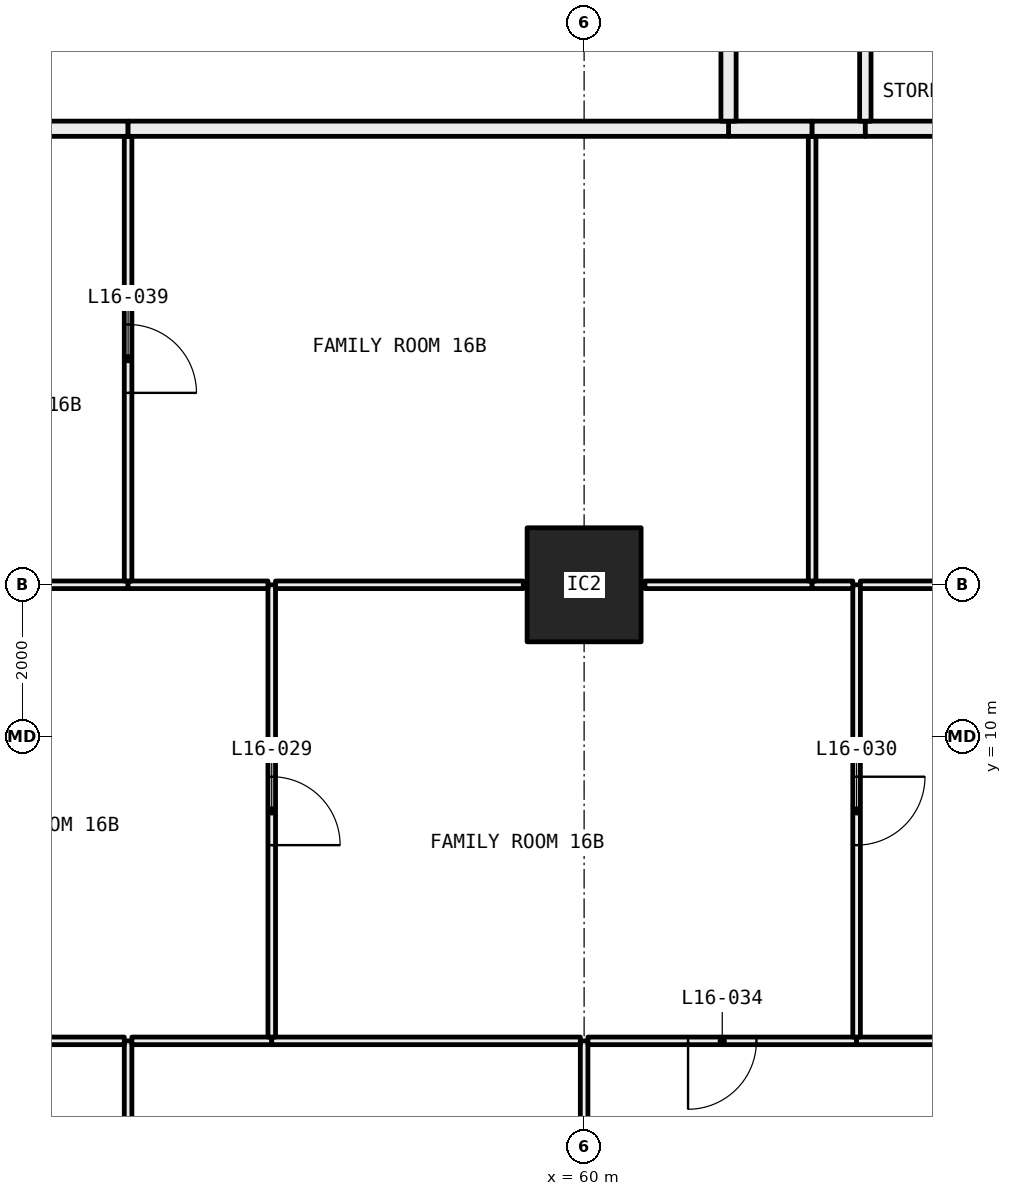
"""IFC4 building model, lengths in metres.
Left out: names, types, materials, properties, quantities, classifications, styles, units other than length and angle.
Written with IfcOpenShell. Run it as: python <this file> out.ifc"""

import sys

from ifc_helpers import new_model, si_unit, direction, frame, frame_2d, origin, origin_2d, place, context, subcontext, project, spatial, rectangle, hollow_rectangle, extrude, element, fill, save


model = new_model("IFC4")
c1 = context("Model", 3, precision=1e-05, world=origin(), true_north=direction((0.0, 1.0)))
c2 = subcontext(c1, "Body", "Model", "MODEL_VIEW")
j1 = project(units=[si_unit("LENGTHUNIT", "METRE"), si_unit("PLANEANGLEUNIT", "RADIAN")], contexts=[c1])
p1 = place(None, origin())
s1 = spatial("IfcSite", under=j1, at=p1, CompositionType="ELEMENT")
p2 = place(p1, origin())
s2 = spatial("IfcBuilding", under=s1, at=p2, CompositionType="ELEMENT")
p3 = place(p2, frame((0.0, 0.0, 67.95)))
s3 = spatial("IfcBuildingStorey", under=s2, at=p3, CompositionType="ELEMENT", Elevation=67.95)
p4 = place(p3, frame((60.0, 12.0, 0.0), z_axis=(0.0, 0.0, 1.0), x_axis=(1.0, 0.0, 0.0)))
e1 = element("IfcColumn", 1, at=p4, inside=s3, PredefinedType="COLUMN", context=c2, shape_type="SweptSolid", body=[
    extrude(hollow_rectangle(XDim=1.5, YDim=1.5, WallThickness=0.065, at=origin_2d()), origin(), (0.0, 0.0, 1.0), 3.05),
])
p5 = place(p3, frame((54.0, 0.72, 0.0), z_axis=(0.0, 0.0, 1.0), x_axis=(0.0, 1.0, 0.0)))
e2 = element("IfcWall", 2, at=p5, inside=s3, PredefinedType="PARTITIONING", context=c2, shape_type="SweptSolid", body=[
    extrude(rectangle(XDim=5.28, YDim=0.1, at=frame_2d((2.64, 0.0))), origin(), (0.0, 0.0, 1.0), 3.05),
])
p6 = place(p5, frame((2.19, 0.0, 0.0)))
e3 = element("IfcOpeningElement", 3, at=p6, cuts=e2, PredefinedType="OPENING", context=c2, shape_type="SweptSolid", body=[
    extrude(rectangle(XDim=0.9, YDim=2.1, at=frame_2d((0.45, 1.05))), frame((0.0, 0.06, 0.0), z_axis=(0.0, -1.0, 0.0), x_axis=(1.0, 0.0, 0.0)), (0.0, 0.0, 1.0), 0.12),
])
p7 = place(p3, frame((53.95, 6.0, 0.0), z_axis=(0.0, 0.0, 1.0), x_axis=(-1.0, 0.0, 0.0)))
e4 = element("IfcWall", 4, at=p7, inside=s3, PredefinedType="PARTITIONING", context=c2, shape_type="SweptSolid", body=[
    extrude(rectangle(XDim=5.755, YDim=0.1, at=frame_2d((2.877, 0.0))), origin(), (0.0, 0.0, 1.0), 3.05),
])
p8 = place(p7, frame((2.427, 0.0, 0.0)))
e5 = element("IfcOpeningElement", 5, at=p8, cuts=e4, PredefinedType="OPENING", context=c2, shape_type="SweptSolid", body=[
    extrude(rectangle(XDim=0.9, YDim=2.1, at=frame_2d((0.45, 1.05))), frame((0.0, 0.06, 0.0), z_axis=(0.0, -1.0, 0.0), x_axis=(1.0, 0.0, 0.0)), (0.0, 0.0, 1.0), 0.12),
])
p9 = place(p3, frame((60.0, 0.72, 0.0), z_axis=(0.0, 0.0, 1.0), x_axis=(0.0, 1.0, 0.0)))
e6 = element("IfcWall", 6, at=p9, inside=s3, PredefinedType="PARTITIONING", context=c2, shape_type="SweptSolid", body=[
    extrude(rectangle(XDim=5.28, YDim=0.1, at=frame_2d((2.64, 0.0))), origin(), (0.0, 0.0, 1.0), 2.45),
])
p10 = place(p3, frame((55.89, 6.0, 0.0), z_axis=(0.0, 0.0, 1.0), x_axis=(-1.0, 0.0, 0.0)))
e7 = element("IfcWall", 7, at=p10, inside=s3, PredefinedType="PARTITIONING", context=c2, shape_type="SweptSolid", body=[
    extrude(rectangle(XDim=1.84, YDim=0.1, at=frame_2d((0.92, 0.0))), origin(), (0.0, 0.0, 1.0), 3.05),
])
p11 = place(p3, frame((59.95, 6.0, 0.0), z_axis=(0.0, 0.0, 1.0), x_axis=(-1.0, 0.0, 0.0)))
e8 = element("IfcWall", 8, at=p11, inside=s3, PredefinedType="PARTITIONING", context=c2, shape_type="SweptSolid", body=[
    extrude(rectangle(XDim=4.06, YDim=0.1, at=frame_2d((2.03, 0.0))), origin(), (0.0, 0.0, 1.0), 2.45),
])
p12 = place(p3, frame((63.585, 6.0, 0.0), z_axis=(0.0, 0.0, 1.0), x_axis=(-1.0, 0.0, 0.0)))
e9 = element("IfcWall", 9, at=p12, inside=s3, PredefinedType="PARTITIONING", context=c2, shape_type="SweptSolid", body=[
    extrude(rectangle(XDim=3.535, YDim=0.1, at=frame_2d((1.768, 0.0))), origin(), (0.0, 0.0, 1.0), 2.45),
])
p13 = place(p12, frame((1.317, 0.0, 0.0)))
e10 = element("IfcOpeningElement", 10, at=p13, cuts=e9, PredefinedType="OPENING", context=c2, shape_type="SweptSolid", body=[
    extrude(rectangle(XDim=0.9, YDim=2.1, at=frame_2d((0.45, 1.05))), frame((0.0, 0.06, 0.0), z_axis=(0.0, -1.0, 0.0), x_axis=(1.0, 0.0, 0.0)), (0.0, 0.0, 1.0), 0.12),
])
p14 = place(p3, frame((65.28, 6.0, 0.0), z_axis=(0.0, 0.0, 1.0), x_axis=(-1.0, 0.0, 0.0)))
e11 = element("IfcWall", 11, at=p14, inside=s3, PredefinedType="PARTITIONING", context=c2, shape_type="SweptSolid", body=[
    extrude(rectangle(XDim=1.695, YDim=0.1, at=frame_2d((0.848, 0.0))), origin(), (0.0, 0.0, 1.0), 3.05),
])
p15 = place(p3, frame((55.89, 6.05, 0.0), z_axis=(0.0, 0.0, 1.0), x_axis=(0.0, 1.0, 0.0)))
e12 = element("IfcWall", 12, at=p15, inside=s3, PredefinedType="PARTITIONING", context=c2, shape_type="SweptSolid", body=[
    extrude(rectangle(XDim=5.95, YDim=0.1, at=frame_2d((2.975, 0.0))), origin(), (0.0, 0.0, 1.0), 2.45),
])
p16 = place(p15, frame((2.525, 0.0, 0.0)))
e13 = element("IfcOpeningElement", 13, at=p16, cuts=e12, PredefinedType="OPENING", context=c2, shape_type="SweptSolid", body=[
    extrude(rectangle(XDim=0.9, YDim=2.1, at=frame_2d((0.45, 1.05))), frame((0.0, 0.06, 0.0), z_axis=(0.0, -1.0, 0.0), x_axis=(1.0, 0.0, 0.0)), (0.0, 0.0, 1.0), 0.12),
])
p17 = place(p3, frame((54.0, 12.0, 0.0), z_axis=(0.0, 0.0, 1.0), x_axis=(-1.0, 0.0, 0.0)))
e14 = element("IfcWall", 14, at=p17, inside=s3, PredefinedType="PARTITIONING", context=c2, shape_type="SweptSolid", body=[
    extrude(rectangle(XDim=4.5, YDim=0.1, at=frame_2d((2.25, 0.0))), origin(), (0.0, 0.0, 1.0), 2.45),
])
p18 = place(p17, frame((1.8, 0.0, 0.0)))
e15 = element("IfcOpeningElement", 15, at=p18, cuts=e14, PredefinedType="OPENING", context=c2, shape_type="SweptSolid", body=[
    extrude(rectangle(XDim=0.9, YDim=2.1, at=frame_2d((0.45, 1.05))), frame((0.0, 0.06, 0.0), z_axis=(0.0, -1.0, 0.0), x_axis=(1.0, 0.0, 0.0)), (0.0, 0.0, 1.0), 0.12),
])
p19 = place(p3, frame((55.84, 12.0, 0.0), z_axis=(0.0, 0.0, 1.0), x_axis=(-1.0, 0.0, 0.0)))
e16 = element("IfcWall", 16, at=p19, inside=s3, PredefinedType="PARTITIONING", context=c2, shape_type="SweptSolid", body=[
    extrude(rectangle(XDim=1.84, YDim=0.1, at=frame_2d((0.92, 0.0))), origin(), (0.0, 0.0, 1.0), 2.45),
])
p20 = place(p3, frame((63.585, 6.05, 0.0), z_axis=(0.0, 0.0, 1.0), x_axis=(0.0, 1.0, 0.0)))
e17 = element("IfcWall", 17, at=p20, inside=s3, PredefinedType="PARTITIONING", context=c2, shape_type="SweptSolid", body=[
    extrude(rectangle(XDim=5.95, YDim=0.1, at=frame_2d((2.975, 0.0))), origin(), (0.0, 0.0, 1.0), 2.45),
])
p21 = place(p20, frame((2.525, 0.0, 0.0)))
e18 = element("IfcOpeningElement", 18, at=p21, cuts=e17, PredefinedType="OPENING", context=c2, shape_type="SweptSolid", body=[
    extrude(rectangle(XDim=0.9, YDim=2.1, at=frame_2d((0.45, 1.05))), frame((0.0, 0.06, 0.0), z_axis=(0.0, -1.0, 0.0), x_axis=(1.0, 0.0, 0.0)), (0.0, 0.0, 1.0), 0.12),
])
p22 = place(p3, frame((59.2, 12.0, 0.0), z_axis=(0.0, 0.0, 1.0), x_axis=(-1.0, 0.0, 0.0)))
e19 = element("IfcWall", 19, at=p22, inside=s3, PredefinedType="PARTITIONING", context=c2, shape_type="SweptSolid", body=[
    extrude(rectangle(XDim=3.26, YDim=0.1, at=frame_2d((1.63, 0.0))), origin(), (0.0, 0.0, 1.0), 2.45),
])
p23 = place(p3, frame((63.0, 12.0, 0.0), z_axis=(0.0, 0.0, 1.0), x_axis=(-1.0, 0.0, 0.0)))
e20 = element("IfcWall", 20, at=p23, inside=s3, PredefinedType="PARTITIONING", context=c2, shape_type="SweptSolid", body=[
    extrude(rectangle(XDim=2.2, YDim=0.1, at=frame_2d((1.1, 0.0))), origin(), (0.0, 0.0, 1.0), 2.45),
])
p24 = place(p3, frame((63.535, 12.0, 0.0), z_axis=(0.0, 0.0, 1.0), x_axis=(-1.0, 0.0, 0.0)))
e21 = element("IfcWall", 21, at=p24, inside=s3, PredefinedType="PARTITIONING", context=c2, shape_type="SweptSolid", body=[
    extrude(rectangle(XDim=0.535, YDim=0.1, at=frame_2d((0.268, 0.0))), origin(), (0.0, 0.0, 1.0), 2.45),
])
p25 = place(p3, frame((71.28, 12.0, 0.0), z_axis=(0.0, 0.0, 1.0), x_axis=(-1.0, 0.0, 0.0)))
e22 = element("IfcWall", 22, at=p25, inside=s3, PredefinedType="PARTITIONING", context=c2, shape_type="SweptSolid", body=[
    extrude(rectangle(XDim=7.645, YDim=0.1, at=frame_2d((3.823, 0.0))), origin(), (0.0, 0.0, 1.0), 2.45),
])
p26 = place(p25, frame((3.373, 0.0, 0.0)))
e23 = element("IfcOpeningElement", 23, at=p26, cuts=e22, PredefinedType="OPENING", context=c2, shape_type="SweptSolid", body=[
    extrude(rectangle(XDim=0.9, YDim=2.1, at=frame_2d((0.45, 1.05))), frame((0.0, 0.06, 0.0), z_axis=(0.0, -1.0, 0.0), x_axis=(1.0, 0.0, 0.0)), (0.0, 0.0, 1.0), 0.12),
])
p27 = place(p3, frame((54.0, 12.05, 0.0), z_axis=(0.0, 0.0, 1.0), x_axis=(0.0, 1.0, 0.0)))
e24 = element("IfcWall", 24, at=p27, inside=s3, PredefinedType="PARTITIONING", context=c2, shape_type="SweptSolid", body=[
    extrude(rectangle(XDim=5.85, YDim=0.1, at=frame_2d((2.925, 0.0))), origin(), (0.0, 0.0, 1.0), 2.45),
])
p28 = place(p27, frame((2.475, 0.0, 0.0)))
e25 = element("IfcOpeningElement", 25, at=p28, cuts=e24, PredefinedType="OPENING", context=c2, shape_type="SweptSolid", body=[
    extrude(rectangle(XDim=0.9, YDim=2.1, at=frame_2d((0.45, 1.05))), frame((0.0, 0.06, 0.0), z_axis=(0.0, -1.0, 0.0), x_axis=(1.0, 0.0, 0.0)), (0.0, 0.0, 1.0), 0.12),
])
p29 = place(p3, frame((54.0, 18.0, 0.0), z_axis=(0.0, 0.0, 1.0), x_axis=(-1.0, 0.0, 0.0)))
e26 = element("IfcWall", 26, at=p29, inside=s3, PredefinedType="PARTITIONING", context=c2, shape_type="SweptSolid", body=[
    extrude(rectangle(XDim=4.5, YDim=0.2, at=frame_2d((2.25, 0.0))), origin(), (0.0, 0.0, 1.0), 3.05),
])
p30 = place(p29, frame((1.75, 0.0, 0.0)))
e27 = element("IfcOpeningElement", 27, at=p30, cuts=e26, PredefinedType="OPENING", context=c2, shape_type="SweptSolid", body=[
    extrude(rectangle(XDim=1.0, YDim=2.1, at=frame_2d((0.5, 1.05))), frame((0.0, 0.11, 0.0), z_axis=(0.0, -1.0, 0.0), x_axis=(1.0, 0.0, 0.0)), (0.0, 0.0, 1.0), 0.22),
])
p31 = place(p3, frame((63.0, 12.05, 0.0), z_axis=(0.0, 0.0, 1.0), x_axis=(0.0, 1.0, 0.0)))
e28 = element("IfcWall", 28, at=p31, inside=s3, PredefinedType="PARTITIONING", context=c2, shape_type="SweptSolid", body=[
    extrude(rectangle(XDim=5.85, YDim=0.1, at=frame_2d((2.925, 0.0))), origin(), (0.0, 0.0, 1.0), 2.45),
])
p32 = place(p3, frame((63.0, 18.0, 0.0), z_axis=(0.0, 0.0, 1.0), x_axis=(-1.0, 0.0, 0.0)))
e29 = element("IfcWall", 29, at=p32, inside=s3, PredefinedType="PARTITIONING", context=c2, shape_type="SweptSolid", body=[
    extrude(rectangle(XDim=1.1, YDim=0.2, at=frame_2d((0.55, 0.0))), origin(), (0.0, 0.0, 1.0), 3.05),
])
p33 = place(p3, frame((61.9, 18.0, 0.0), z_axis=(0.0, 0.0, 1.0), x_axis=(-1.0, 0.0, 0.0)))
e30 = element("IfcWall", 30, at=p33, inside=s3, PredefinedType="PARTITIONING", context=c2, shape_type="SweptSolid", body=[
    extrude(rectangle(XDim=7.9, YDim=0.2, at=frame_2d((3.95, 0.0))), origin(), (0.0, 0.0, 1.0), 3.05),
])
p34 = place(p3, frame((63.7, 18.0, 0.0), z_axis=(0.0, 0.0, 1.0), x_axis=(-1.0, 0.0, 0.0)))
e31 = element("IfcWall", 31, at=p34, inside=s3, PredefinedType="PARTITIONING", context=c2, shape_type="SweptSolid", body=[
    extrude(rectangle(XDim=0.7, YDim=0.2, at=frame_2d((0.35, 0.0))), origin(), (0.0, 0.0, 1.0), 3.05),
])
p35 = place(p3, frame((66.0, 18.0, 0.0), z_axis=(0.0, 0.0, 1.0), x_axis=(-1.0, 0.0, 0.0)))
e32 = element("IfcWall", 32, at=p35, inside=s3, PredefinedType="PARTITIONING", context=c2, shape_type="SweptSolid", body=[
    extrude(rectangle(XDim=2.3, YDim=0.2, at=frame_2d((1.15, 0.0))), origin(), (0.0, 0.0, 1.0), 3.05),
])
p36 = place(p3, frame((63.7, 18.1, 0.0), z_axis=(0.0, 0.0, 1.0), x_axis=(0.0, 1.0, 0.0)))
e33 = element("IfcWall", 33, at=p36, inside=s3, PredefinedType="PARTITIONING", context=c2, shape_type="SweptSolid", body=[
    extrude(rectangle(XDim=2.9, YDim=0.15, at=frame_2d((1.45, 0.0))), origin(), (0.0, 0.0, 1.0), 3.05),
])
p37 = place(p3, frame((61.9, 21.0, 0.0), z_axis=(0.0, 0.0, 1.0), x_axis=(0.0, -1.0, 0.0)))
e34 = element("IfcWall", 34, at=p37, inside=s3, PredefinedType="PARTITIONING", context=c2, shape_type="SweptSolid", body=[
    extrude(rectangle(XDim=2.9, YDim=0.2, at=frame_2d((1.45, 0.0))), origin(), (0.0, 0.0, 1.0), 3.05),
])
p38 = place(p16, frame((0.9, 0.0, 0.0), x_axis=(-1.0, 0.0, 0.0)))
e35 = element("IfcDoor", 35, at=p38, inside=s3, OperationType="SINGLE_SWING_LEFT", PredefinedType="DOOR", context=c2, shape_type="SweptSolid", body=[
    extrude(rectangle(XDim=0.9, YDim=2.1, at=frame_2d((0.45, 1.05))), frame((0.0, 0.025, 0.0), z_axis=(0.0, -1.0, 0.0), x_axis=(1.0, 0.0, 0.0)), (0.0, 0.0, 1.0), 0.05),
])
fill(e13, e35)
p39 = place(p21, frame((0.9, 0.0, 0.0), x_axis=(-1.0, 0.0, 0.0)))
e36 = element("IfcDoor", 36, at=p39, inside=s3, OperationType="SINGLE_SWING_RIGHT", PredefinedType="DOOR", context=c2, shape_type="SweptSolid", body=[
    extrude(rectangle(XDim=0.9, YDim=2.1, at=frame_2d((0.45, 1.05))), frame((0.0, 0.025, 0.0), z_axis=(0.0, -1.0, 0.0), x_axis=(1.0, 0.0, 0.0)), (0.0, 0.0, 1.0), 0.05),
])
fill(e18, e36)
p40 = place(p13, origin())
e37 = element("IfcDoor", 37, at=p40, inside=s3, OperationType="SINGLE_SWING_LEFT", PredefinedType="DOOR", context=c2, shape_type="SweptSolid", body=[
    extrude(rectangle(XDim=0.9, YDim=2.1, at=frame_2d((0.45, 1.05))), frame((0.0, 0.025, 0.0), z_axis=(0.0, -1.0, 0.0), x_axis=(1.0, 0.0, 0.0)), (0.0, 0.0, 1.0), 0.05),
])
fill(e10, e37)
p41 = place(p28, frame((0.9, 0.0, 0.0), x_axis=(-1.0, 0.0, 0.0)))
e38 = element("IfcDoor", 38, at=p41, inside=s3, OperationType="SINGLE_SWING_LEFT", PredefinedType="DOOR", context=c2, shape_type="SweptSolid", body=[
    extrude(rectangle(XDim=0.9, YDim=2.1, at=frame_2d((0.45, 1.05))), frame((0.0, 0.025, 0.0), z_axis=(0.0, -1.0, 0.0), x_axis=(1.0, 0.0, 0.0)), (0.0, 0.0, 1.0), 0.05),
])
fill(e25, e38)
save(model, sys.argv[1])
